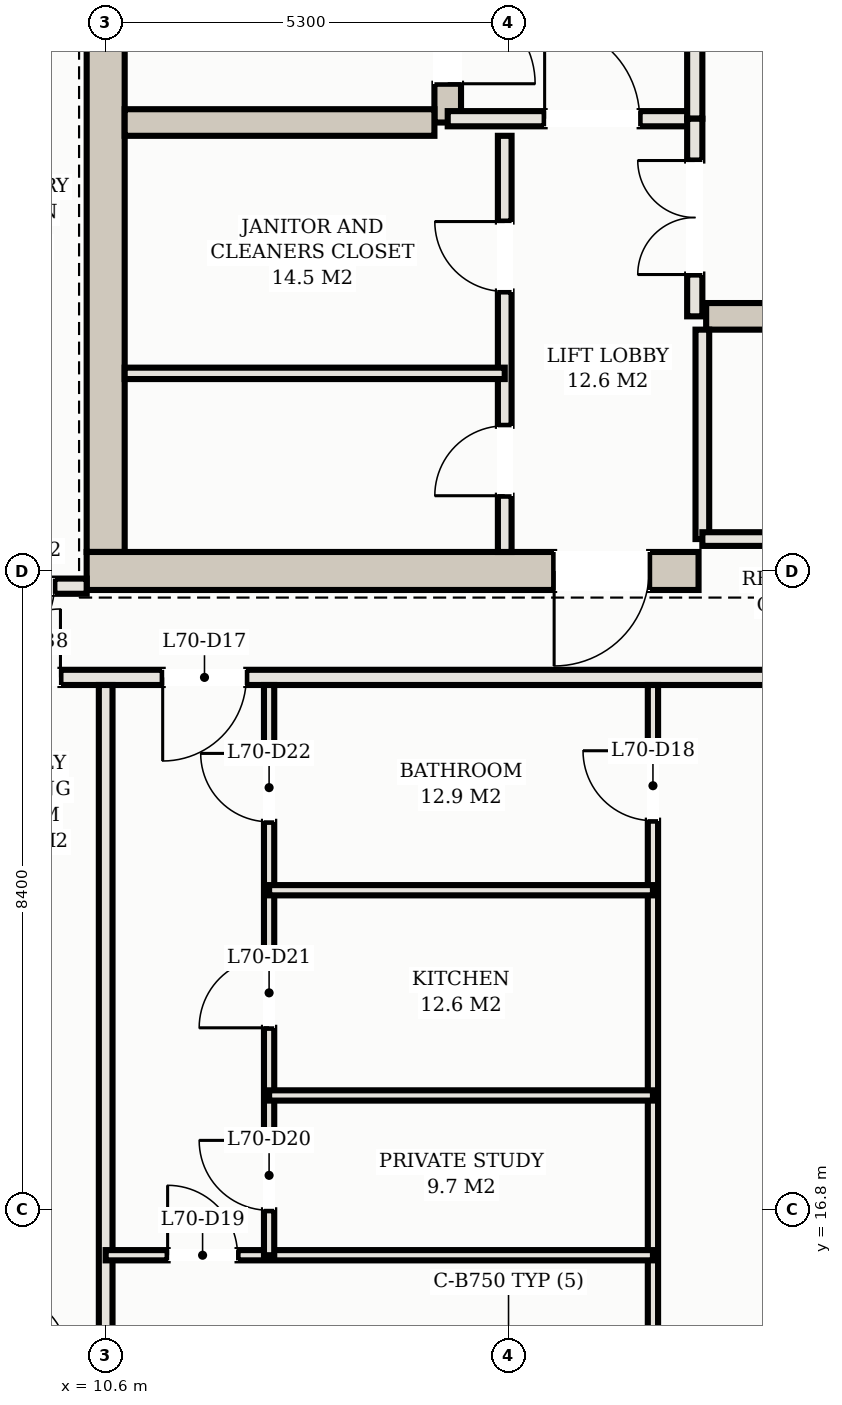
"""IFC4 building model, lengths in metres.
Left out: names, types, materials, properties, quantities, classifications, styles, units other than length and angle.
Written with IfcOpenShell. Run it as: python <this file> out.ifc"""

import sys

from ifc_helpers import new_model, si_unit, direction, frame, frame_2d, origin, place, context, subcontext, project, spatial, rectangle, extrude, element, fill, save


model = new_model("IFC4")
c1 = context("Model", 3, precision=1e-05, world=origin(), true_north=direction((0.0, 1.0)))
c2 = subcontext(c1, "Body", "Model", "MODEL_VIEW")
j1 = project(units=[si_unit("LENGTHUNIT", "METRE"), si_unit("PLANEANGLEUNIT", "RADIAN")], contexts=[c1])
p1 = place(None, origin())
s1 = spatial("IfcSite", under=j1, at=p1, CompositionType="ELEMENT")
p2 = place(p1, origin())
s2 = spatial("IfcBuilding", under=s1, at=p2, CompositionType="ELEMENT")
p3 = place(p2, frame((0.0, 0.0, 252.8)))
s3 = spatial("IfcBuildingStorey", under=s2, at=p3, CompositionType="ELEMENT", Elevation=252.8)
p4 = place(p3, frame((10.6, 25.45, 0.0), z_axis=(0.0, 0.0, 1.0), x_axis=(0.0, 1.0, 0.0)))
e1 = element("IfcWall", 1, at=p4, inside=s3, PredefinedType="SHEAR", context=c2, shape_type="SweptSolid", body=[
    extrude(rectangle(XDim=14.3, YDim=0.5, at=frame_2d((7.15, 0.0))), origin(), (0.0, 0.0, 1.0), 3.11),
])
p5 = place(p3, frame((10.35, 25.2, 0.0), z_axis=(0.0, 0.0, 1.0), x_axis=(1.0, 0.0, 0.0)))
e2 = element("IfcWall", 2, at=p5, inside=s3, PredefinedType="SHEAR", context=c2, shape_type="SweptSolid", body=[
    extrude(rectangle(XDim=8.05, YDim=0.5, at=frame_2d((4.025, 0.0))), origin(), (0.0, 0.0, 1.0), 3.11),
])
p6 = place(p5, frame((6.15, 0.0, 0.0)))
e3 = element("IfcOpeningElement", 3, at=p6, cuts=e2, PredefinedType="OPENING", context=c2, shape_type="SweptSolid", body=[
    extrude(rectangle(XDim=1.25, YDim=2.2, at=frame_2d((0.625, 1.1))), frame((0.0, 0.26, 0.0), z_axis=(0.0, -1.0, 0.0), x_axis=(1.0, 0.0, 0.0)), (0.0, 0.0, 1.0), 0.52),
])
p7 = place(p3, frame((15.1, 31.1, 0.0), z_axis=(0.0, 0.0, 1.0), x_axis=(0.0, 1.0, 0.0)))
e4 = element("IfcWall", 4, at=p7, inside=s3, PredefinedType="SHEAR", context=c2, shape_type="SweptSolid", body=[
    extrude(rectangle(XDim=8.65, YDim=0.35, at=frame_2d((4.325, 0.0))), origin(), (0.0, 0.0, 1.0), 3.11),
])
p8 = place(p7, frame((0.51, 0.0, 0.0)))
e5 = element("IfcOpeningElement", 5, at=p8, cuts=e4, PredefinedType="OPENING", context=c2, shape_type="SweptSolid", body=[
    extrude(rectangle(XDim=1.15, YDim=2.2, at=frame_2d((0.575, 1.1))), frame((0.0, 0.185, 0.0), z_axis=(0.0, -1.0, 0.0), x_axis=(1.0, 0.0, 0.0)), (0.0, 0.0, 1.0), 0.37),
])
p9 = place(p3, frame((10.85, 31.1, 0.0), z_axis=(0.0, 0.0, 1.0), x_axis=(1.0, 0.0, 0.0)))
e6 = element("IfcWall", 6, at=p9, inside=s3, PredefinedType="SHEAR", context=c2, shape_type="SweptSolid", body=[
    extrude(rectangle(XDim=4.075, YDim=0.35, at=frame_2d((2.038, 0.0))), origin(), (0.0, 0.0, 1.0), 3.11),
])
p10 = place(p3, frame((18.5, 28.55, 0.0), z_axis=(0.0, 0.0, 1.0), x_axis=(1.0, 0.0, 0.0)))
e7 = element("IfcWall", 7, at=p10, inside=s3, PredefinedType="SHEAR", context=c2, shape_type="SweptSolid", body=[
    extrude(rectangle(XDim=16.0, YDim=0.35, at=frame_2d((8.0, 0.0))), origin(), (0.0, 0.0, 1.0), 3.11),
])
p11 = place(p3, frame((15.1, 31.15, 0.0), z_axis=(0.0, 0.0, 1.0), x_axis=(1.0, 0.0, 0.0)))
e8 = element("IfcWall", 8, at=p11, inside=s3, PredefinedType="PARTITIONING", context=c2, shape_type="SweptSolid", body=[
    extrude(rectangle(XDim=3.25, YDim=0.2, at=frame_2d((1.625, 0.0))), origin(), (0.0, 0.0, 1.0), 2.45),
])
p12 = place(p11, frame((1.275, 0.0, 0.0)))
e9 = element("IfcOpeningElement", 9, at=p12, cuts=e8, PredefinedType="OPENING", context=c2, shape_type="SweptSolid", body=[
    extrude(rectangle(XDim=1.25, YDim=2.2, at=frame_2d((0.625, 1.1))), frame((0.0, 0.11, 0.0), z_axis=(0.0, -1.0, 0.0), x_axis=(1.0, 0.0, 0.0)), (0.0, 0.0, 1.0), 0.22),
])
p13 = place(p3, frame((18.35, 31.15, 0.0), z_axis=(0.0, 0.0, 1.0), x_axis=(0.0, 1.0, 0.0)))
e10 = element("IfcWall", 10, at=p13, inside=s3, PredefinedType="PARTITIONING", context=c2, shape_type="SweptSolid", body=[
    extrude(rectangle(XDim=5.15, YDim=0.2, at=frame_2d((2.575, 0.0))), origin(), (0.0, 0.0, 1.0), 2.45),
])
p14 = place(p13, frame((1.875, 0.0, 0.0)))
e11 = element("IfcOpeningElement", 11, at=p14, cuts=e10, PredefinedType="OPENING", context=c2, shape_type="SweptSolid", body=[
    extrude(rectangle(XDim=1.25, YDim=2.2, at=frame_2d((0.625, 1.1))), frame((0.0, 0.11, 0.0), z_axis=(0.0, -1.0, 0.0), x_axis=(1.0, 0.0, 0.0)), (0.0, 0.0, 1.0), 0.22),
])
p15 = place(p3, frame((15.85, 25.45, 0.0), z_axis=(0.0, 0.0, 1.0), x_axis=(0.0, 1.0, 0.0)))
e12 = element("IfcWall", 12, at=p15, inside=s3, PredefinedType="PARTITIONING", context=c2, shape_type="SweptSolid", body=[
    extrude(rectangle(XDim=5.475, YDim=0.18, at=frame_2d((2.738, 0.0))), origin(), (0.0, 0.0, 1.0), 2.45),
])
p16 = place(p15, frame((0.74, 0.0, 0.0)))
e13 = element("IfcOpeningElement", 13, at=p16, cuts=e12, PredefinedType="OPENING", context=c2, shape_type="SweptSolid", body=[
    extrude(rectangle(XDim=0.92, YDim=2.15, at=frame_2d((0.46, 1.075))), frame((0.0, 0.1, 0.0), z_axis=(0.0, -1.0, 0.0), x_axis=(1.0, 0.0, 0.0)), (0.0, 0.0, 1.0), 0.2),
])
p17 = place(p15, frame((3.427, 0.0, 0.0)))
e14 = element("IfcOpeningElement", 14, at=p17, cuts=e12, PredefinedType="OPENING", context=c2, shape_type="SweptSolid", body=[
    extrude(rectangle(XDim=0.92, YDim=2.15, at=frame_2d((0.46, 1.075))), frame((0.0, 0.1, 0.0), z_axis=(0.0, -1.0, 0.0), x_axis=(1.0, 0.0, 0.0)), (0.0, 0.0, 1.0), 0.2),
])
p18 = place(p3, frame((10.85, 27.8, 0.0), z_axis=(0.0, 0.0, 1.0), x_axis=(1.0, 0.0, 0.0)))
e15 = element("IfcWall", 15, at=p18, inside=s3, PredefinedType="PARTITIONING", context=c2, shape_type="SweptSolid", body=[
    extrude(rectangle(XDim=5.0, YDim=0.15, at=frame_2d((2.5, 0.0))), origin(), (0.0, 0.0, 1.0), 2.45),
])
p19 = place(p3, frame((18.35, 28.55, 0.0), z_axis=(0.0, 0.0, 1.0), x_axis=(0.0, 1.0, 0.0)))
e16 = element("IfcWall", 16, at=p19, inside=s3, PredefinedType="PARTITIONING", context=c2, shape_type="SweptSolid", body=[
    extrude(rectangle(XDim=2.6, YDim=0.2, at=frame_2d((1.3, 0.0))), origin(), (0.0, 0.0, 1.0), 2.45),
])
p20 = place(p19, frame((0.55, 0.0, 0.0)))
e17 = element("IfcOpeningElement", 17, at=p20, cuts=e16, PredefinedType="OPENING", context=c2, shape_type="SweptSolid", body=[
    extrude(rectangle(XDim=1.5, YDim=2.25, at=frame_2d((0.75, 1.125))), frame((0.0, 0.11, 0.0), z_axis=(0.0, -1.0, 0.0), x_axis=(1.0, 0.0, 0.0)), (0.0, 0.0, 1.0), 0.22),
])
p21 = place(p3, frame((18.45, 25.62, 0.0), z_axis=(0.0, 0.0, 1.0), x_axis=(0.0, 1.0, 0.0)))
e18 = element("IfcWall", 18, at=p21, inside=s3, PredefinedType="PARTITIONING", context=c2, shape_type="SweptSolid", body=[
    extrude(rectangle(XDim=2.755, YDim=0.18, at=frame_2d((1.377, 0.0))), origin(), (0.0, 0.0, 1.0), 2.45),
])
p22 = place(p3, frame((18.45, 25.62, 0.0), z_axis=(0.0, 0.0, 1.0), x_axis=(1.0, 0.0, 0.0)))
e19 = element("IfcWall", 19, at=p22, inside=s3, PredefinedType="PARTITIONING", context=c2, shape_type="SweptSolid", body=[
    extrude(rectangle(XDim=7.9, YDim=0.18, at=frame_2d((3.95, 0.0))), origin(), (0.0, 0.0, 1.0), 2.45),
])
p23 = place(p22, frame((3.34, 0.0, 0.0)))
e20 = element("IfcOpeningElement", 20, at=p23, cuts=e19, PredefinedType="OPENING", context=c2, shape_type="SweptSolid", body=[
    extrude(rectangle(XDim=0.92, YDim=2.15, at=frame_2d((0.46, 1.075))), frame((0.0, 0.1, 0.0), z_axis=(0.0, -1.0, 0.0), x_axis=(1.0, 0.0, 0.0)), (0.0, 0.0, 1.0), 0.2),
])
p24 = place(p3, frame((8.6, 23.8, 0.0), z_axis=(0.0, 0.0, 1.0), x_axis=(1.0, 0.0, 0.0)))
e21 = element("IfcWall", 21, at=p24, inside=s3, PredefinedType="PARTITIONING", context=c2, shape_type="SweptSolid", body=[
    extrude(rectangle(XDim=35.8, YDim=0.2, at=frame_2d((17.9, 0.0))), origin(), (0.0, 0.0, 1.0), 2.45),
])
p25 = place(p24, frame((2.75, 0.0, 0.0)))
e22 = element("IfcOpeningElement", 22, at=p25, cuts=e21, PredefinedType="OPENING", context=c2, shape_type="SweptSolid", body=[
    extrude(rectangle(XDim=1.1, YDim=2.25, at=frame_2d((0.55, 1.125))), frame((0.0, 0.11, 0.0), z_axis=(0.0, -1.0, 0.0), x_axis=(1.0, 0.0, 0.0)), (0.0, 0.0, 1.0), 0.22),
])
p26 = place(p24, frame((18.85, 0.0, 0.0)))
e23 = element("IfcOpeningElement", 23, at=p26, cuts=e21, PredefinedType="OPENING", context=c2, shape_type="SweptSolid", body=[
    extrude(rectangle(XDim=1.1, YDim=2.25, at=frame_2d((0.55, 1.125))), frame((0.0, 0.11, 0.0), z_axis=(0.0, -1.0, 0.0), x_axis=(1.0, 0.0, 0.0)), (0.0, 0.0, 1.0), 0.22),
])
p27 = place(p24, frame((0.505, 0.0, 0.0)))
e24 = element("IfcOpeningElement", 24, at=p27, cuts=e21, PredefinedType="OPENING", context=c2, shape_type="SweptSolid", body=[
    extrude(rectangle(XDim=0.9, YDim=2.15, at=frame_2d((0.45, 1.075))), frame((0.0, 0.11, 0.0), z_axis=(0.0, -1.0, 0.0), x_axis=(1.0, 0.0, 0.0)), (0.0, 0.0, 1.0), 0.22),
])
p28 = place(p24, frame((34.395, 0.0, 0.0)))
e25 = element("IfcOpeningElement", 25, at=p28, cuts=e21, PredefinedType="OPENING", context=c2, shape_type="SweptSolid", body=[
    extrude(rectangle(XDim=0.9, YDim=2.15, at=frame_2d((0.45, 1.075))), frame((0.0, 0.11, 0.0), z_axis=(0.0, -1.0, 0.0), x_axis=(1.0, 0.0, 0.0)), (0.0, 0.0, 1.0), 0.22),
])
p29 = place(p3, frame((8.6, 25.0, 0.0), z_axis=(0.0, 0.0, 1.0), x_axis=(1.0, 0.0, 0.0)))
e26 = element("IfcWall", 26, at=p29, inside=s3, PredefinedType="PARTITIONING", context=c2, shape_type="SweptSolid", body=[
    extrude(rectangle(XDim=1.75, YDim=0.2, at=frame_2d((0.875, 0.0))), origin(), (0.0, 0.0, 1.0), 2.45),
])
p30 = place(p29, frame((0.425, 0.0, 0.0)))
e27 = element("IfcOpeningElement", 27, at=p30, cuts=e26, PredefinedType="OPENING", context=c2, shape_type="SweptSolid", body=[
    extrude(rectangle(XDim=0.9, YDim=2.15, at=frame_2d((0.45, 1.075))), frame((0.0, 0.11, 0.0), z_axis=(0.0, -1.0, 0.0), x_axis=(1.0, 0.0, 0.0)), (0.0, 0.0, 1.0), 0.22),
])
p31 = place(p3, frame((10.6, 12.62, 0.0), z_axis=(0.0, 0.0, 1.0), x_axis=(0.0, 1.0, 0.0)))
e28 = element("IfcWall", 28, at=p31, inside=s3, PredefinedType="PARTITIONING", context=c2, shape_type="SweptSolid", body=[
    extrude(rectangle(XDim=11.08, YDim=0.18, at=frame_2d((5.54, 0.0))), origin(), (0.0, 0.0, 1.0), 2.45),
])
p32 = place(p3, frame((17.8, 8.42, 0.0), z_axis=(0.0, 0.0, 1.0), x_axis=(0.0, 1.0, 0.0)))
e29 = element("IfcWall", 29, at=p32, inside=s3, PredefinedType="PARTITIONING", context=c2, shape_type="SweptSolid", body=[
    extrude(rectangle(XDim=15.28, YDim=0.135, at=frame_2d((7.64, 0.0))), origin(), (0.0, 0.0, 1.0), 2.45),
])
p33 = place(p32, frame((13.495, 0.0, 0.0)))
e30 = element("IfcOpeningElement", 30, at=p33, cuts=e29, PredefinedType="OPENING", context=c2, shape_type="SweptSolid", body=[
    extrude(rectangle(XDim=0.92, YDim=2.15, at=frame_2d((0.46, 1.075))), frame((0.0, 0.078, 0.0), z_axis=(0.0, -1.0, 0.0), x_axis=(1.0, 0.0, 0.0)), (0.0, 0.0, 1.0), 0.155),
])
p34 = place(p3, frame((10.6, 16.198, 0.0), z_axis=(0.0, 0.0, 1.0), x_axis=(1.0, 0.0, 0.0)))
e31 = element("IfcWall", 31, at=p34, inside=s3, PredefinedType="PARTITIONING", context=c2, shape_type="SweptSolid", body=[
    extrude(rectangle(XDim=7.2, YDim=0.135, at=frame_2d((3.6, 0.0))), origin(), (0.0, 0.0, 1.0), 2.45),
])
p35 = place(p34, frame((0.815, 0.0, 0.0)))
e32 = element("IfcOpeningElement", 32, at=p35, cuts=e31, PredefinedType="OPENING", context=c2, shape_type="SweptSolid", body=[
    extrude(rectangle(XDim=0.92, YDim=2.15, at=frame_2d((0.46, 1.075))), frame((0.0, 0.078, 0.0), z_axis=(0.0, -1.0, 0.0), x_axis=(1.0, 0.0, 0.0)), (0.0, 0.0, 1.0), 0.155),
])
p36 = place(p3, frame((12.75, 16.198, 0.0), z_axis=(0.0, 0.0, 1.0), x_axis=(0.0, 1.0, 0.0)))
e33 = element("IfcWall", 33, at=p36, inside=s3, PredefinedType="PARTITIONING", context=c2, shape_type="SweptSolid", body=[
    extrude(rectangle(XDim=7.502, YDim=0.135, at=frame_2d((3.751, 0.0))), origin(), (0.0, 0.0, 1.0), 2.45),
])
p37 = place(p36, frame((0.591, 0.0, 0.0)))
e34 = element("IfcOpeningElement", 34, at=p37, cuts=e33, PredefinedType="OPENING", context=c2, shape_type="SweptSolid", body=[
    extrude(rectangle(XDim=0.92, YDim=2.15, at=frame_2d((0.46, 1.075))), frame((0.0, 0.078, 0.0), z_axis=(0.0, -1.0, 0.0), x_axis=(1.0, 0.0, 0.0)), (0.0, 0.0, 1.0), 0.155),
])
p38 = place(p36, frame((2.992, 0.0, 0.0)))
e35 = element("IfcOpeningElement", 35, at=p38, cuts=e33, PredefinedType="OPENING", context=c2, shape_type="SweptSolid", body=[
    extrude(rectangle(XDim=0.92, YDim=2.15, at=frame_2d((0.46, 1.075))), frame((0.0, 0.078, 0.0), z_axis=(0.0, -1.0, 0.0), x_axis=(1.0, 0.0, 0.0)), (0.0, 0.0, 1.0), 0.155),
])
p39 = place(p36, frame((5.702, 0.0, 0.0)))
e36 = element("IfcOpeningElement", 36, at=p39, cuts=e33, PredefinedType="OPENING", context=c2, shape_type="SweptSolid", body=[
    extrude(rectangle(XDim=0.9, YDim=2.15, at=frame_2d((0.45, 1.075))), frame((0.0, 0.078, 0.0), z_axis=(0.0, -1.0, 0.0), x_axis=(1.0, 0.0, 0.0)), (0.0, 0.0, 1.0), 0.155),
])
for number, where, z_axis, x_axis in (
    (37, (12.75, 18.3, 0.0), (0.0, 0.0, 1.0), (1.0, 0.0, 0.0)),
    (38, (12.75, 21.0, 0.0), (0.0, 0.0, 1.0), (1.0, 0.0, 0.0)),
):
    element("IfcWall", number, at=place(p3, frame(where, z_axis=z_axis, x_axis=x_axis)), inside=s3, PredefinedType="PARTITIONING", context=c2, shape_type="SweptSolid", body=[
        extrude(rectangle(XDim=5.05, YDim=0.135, at=frame_2d((2.525, 0.0))), origin(), (0.0, 0.0, 1.0), 2.45),
    ])
p40 = place(p6, frame((1.25, 0.0, 0.0), z_axis=(0.0, 0.0, 1.0), x_axis=(-1.0, 0.0, 0.0)))
e39 = element("IfcDoor", 39, at=p40, inside=s3, OperationType="SINGLE_SWING_RIGHT", PredefinedType="DOOR", context=c2, shape_type="SweptSolid", body=[
    extrude(rectangle(XDim=1.25, YDim=2.2, at=frame_2d((0.625, 1.1))), frame((0.0, 0.025, 0.0), z_axis=(0.0, -1.0, 0.0), x_axis=(1.0, 0.0, 0.0)), (0.0, 0.0, 1.0), 0.05),
])
fill(e3, e39)
p41 = place(p12, origin())
e40 = element("IfcDoor", 40, at=p41, inside=s3, OperationType="SINGLE_SWING_LEFT", PredefinedType="DOOR", context=c2, shape_type="SweptSolid", body=[
    extrude(rectangle(XDim=1.25, YDim=2.2, at=frame_2d((0.625, 1.1))), frame((0.0, 0.025, 0.0), z_axis=(0.0, -1.0, 0.0), x_axis=(1.0, 0.0, 0.0)), (0.0, 0.0, 1.0), 0.05),
])
fill(e9, e40)
p42 = place(p8, frame((1.15, 0.0, 0.0), z_axis=(0.0, 0.0, 1.0), x_axis=(-1.0, 0.0, 0.0)))
e41 = element("IfcDoor", 41, at=p42, inside=s3, OperationType="SINGLE_SWING_RIGHT", PredefinedType="DOOR", context=c2, shape_type="SweptSolid", body=[
    extrude(rectangle(XDim=1.15, YDim=2.2, at=frame_2d((0.575, 1.1))), frame((0.0, 0.025, 0.0), z_axis=(0.0, -1.0, 0.0), x_axis=(1.0, 0.0, 0.0)), (0.0, 0.0, 1.0), 0.05),
])
fill(e5, e41)
p43 = place(p16, origin())
e42 = element("IfcDoor", 42, at=p43, inside=s3, OperationType="SINGLE_SWING_LEFT", PredefinedType="DOOR", context=c2, shape_type="SweptSolid", body=[
    extrude(rectangle(XDim=0.92, YDim=2.15, at=frame_2d((0.46, 1.075))), frame((0.0, 0.025, 0.0), z_axis=(0.0, -1.0, 0.0), x_axis=(1.0, 0.0, 0.0)), (0.0, 0.0, 1.0), 0.05),
])
fill(e13, e42)
p44 = place(p17, origin())
e43 = element("IfcDoor", 43, at=p44, inside=s3, OperationType="SINGLE_SWING_RIGHT", PredefinedType="DOOR", context=c2, shape_type="SweptSolid", body=[
    extrude(rectangle(XDim=0.92, YDim=2.15, at=frame_2d((0.46, 1.075))), frame((0.0, 0.025, 0.0), z_axis=(0.0, -1.0, 0.0), x_axis=(1.0, 0.0, 0.0)), (0.0, 0.0, 1.0), 0.05),
])
fill(e14, e43)
p45 = place(p20, origin())
e44 = element("IfcDoor", 44, at=p45, inside=s3, OperationType="DOUBLE_DOOR_SINGLE_SWING", PredefinedType="DOOR", context=c2, shape_type="SweptSolid", body=[
    extrude(rectangle(XDim=1.5, YDim=2.25, at=frame_2d((0.75, 1.125))), frame((0.0, 0.025, 0.0), z_axis=(0.0, -1.0, 0.0), x_axis=(1.0, 0.0, 0.0)), (0.0, 0.0, 1.0), 0.05),
])
fill(e17, e44)
p46 = place(p25, frame((1.1, 0.0, 0.0), z_axis=(0.0, 0.0, 1.0), x_axis=(-1.0, 0.0, 0.0)))
e45 = element("IfcDoor", 45, at=p46, inside=s3, OperationType="SINGLE_SWING_RIGHT", PredefinedType="DOOR", context=c2, shape_type="SweptSolid", body=[
    extrude(rectangle(XDim=1.1, YDim=2.25, at=frame_2d((0.55, 1.125))), frame((0.0, 0.025, 0.0), z_axis=(0.0, -1.0, 0.0), x_axis=(1.0, 0.0, 0.0)), (0.0, 0.0, 1.0), 0.05),
])
fill(e22, e45)
p47 = place(p33, origin())
e46 = element("IfcDoor", 46, at=p47, inside=s3, OperationType="SINGLE_SWING_RIGHT", PredefinedType="DOOR", context=c2, shape_type="SweptSolid", body=[
    extrude(rectangle(XDim=0.92, YDim=2.15, at=frame_2d((0.46, 1.075))), frame((0.0, 0.025, 0.0), z_axis=(0.0, -1.0, 0.0), x_axis=(1.0, 0.0, 0.0)), (0.0, 0.0, 1.0), 0.05),
])
fill(e30, e46)
p48 = place(p35, origin())
e47 = element("IfcDoor", 47, at=p48, inside=s3, OperationType="SINGLE_SWING_LEFT", PredefinedType="DOOR", context=c2, shape_type="SweptSolid", body=[
    extrude(rectangle(XDim=0.92, YDim=2.15, at=frame_2d((0.46, 1.075))), frame((0.0, 0.025, 0.0), z_axis=(0.0, -1.0, 0.0), x_axis=(1.0, 0.0, 0.0)), (0.0, 0.0, 1.0), 0.05),
])
fill(e32, e47)
p49 = place(p37, origin())
e48 = element("IfcDoor", 48, at=p49, inside=s3, OperationType="SINGLE_SWING_RIGHT", PredefinedType="DOOR", context=c2, shape_type="SweptSolid", body=[
    extrude(rectangle(XDim=0.92, YDim=2.15, at=frame_2d((0.46, 1.075))), frame((0.0, 0.025, 0.0), z_axis=(0.0, -1.0, 0.0), x_axis=(1.0, 0.0, 0.0)), (0.0, 0.0, 1.0), 0.05),
])
fill(e34, e48)
p50 = place(p38, origin())
e49 = element("IfcDoor", 49, at=p50, inside=s3, OperationType="SINGLE_SWING_LEFT", PredefinedType="DOOR", context=c2, shape_type="SweptSolid", body=[
    extrude(rectangle(XDim=0.92, YDim=2.15, at=frame_2d((0.46, 1.075))), frame((0.0, 0.025, 0.0), z_axis=(0.0, -1.0, 0.0), x_axis=(1.0, 0.0, 0.0)), (0.0, 0.0, 1.0), 0.05),
])
fill(e35, e49)
p51 = place(p39, origin())
e50 = element("IfcDoor", 50, at=p51, inside=s3, OperationType="SINGLE_SWING_RIGHT", PredefinedType="DOOR", context=c2, shape_type="SweptSolid", body=[
    extrude(rectangle(XDim=0.9, YDim=2.15, at=frame_2d((0.45, 1.075))), frame((0.0, 0.025, 0.0), z_axis=(0.0, -1.0, 0.0), x_axis=(1.0, 0.0, 0.0)), (0.0, 0.0, 1.0), 0.05),
])
fill(e36, e50)
p52 = place(p27, origin())
e51 = element("IfcDoor", 51, at=p52, inside=s3, OperationType="SINGLE_SWING_RIGHT", PredefinedType="DOOR", context=c2, shape_type="SweptSolid", body=[
    extrude(rectangle(XDim=0.9, YDim=2.15, at=frame_2d((0.45, 1.075))), frame((0.0, 0.025, 0.0), z_axis=(0.0, -1.0, 0.0), x_axis=(1.0, 0.0, 0.0)), (0.0, 0.0, 1.0), 0.05),
])
fill(e24, e51)
p53 = place(p30, frame((0.9, 0.0, 0.0), z_axis=(0.0, 0.0, 1.0), x_axis=(-1.0, 0.0, 0.0)))
e52 = element("IfcDoor", 52, at=p53, inside=s3, OperationType="SINGLE_SWING_RIGHT", PredefinedType="DOOR", context=c2, shape_type="SweptSolid", body=[
    extrude(rectangle(XDim=0.9, YDim=2.15, at=frame_2d((0.45, 1.075))), frame((0.0, 0.025, 0.0), z_axis=(0.0, -1.0, 0.0), x_axis=(1.0, 0.0, 0.0)), (0.0, 0.0, 1.0), 0.05),
])
fill(e27, e52)
save(model, sys.argv[1])
